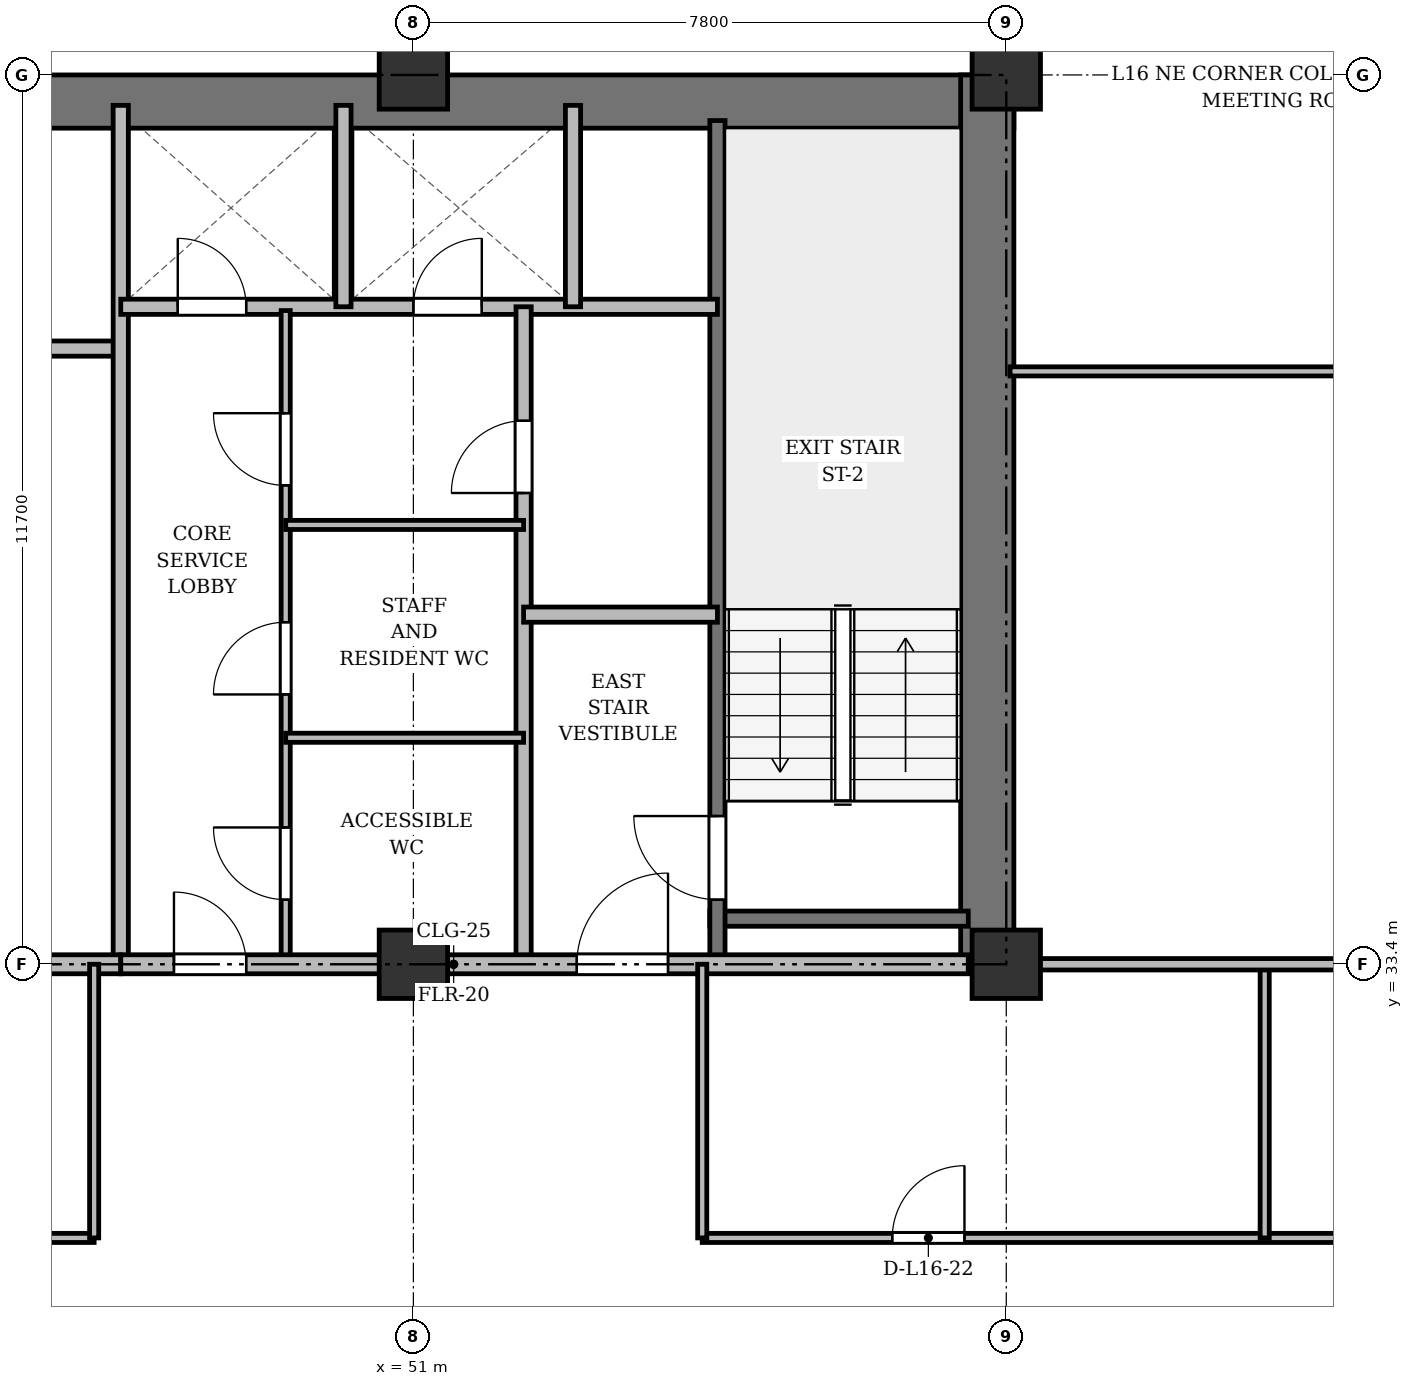
"""IFC4 building model, lengths in metres.
Left out: names, types, materials, properties, quantities, classifications, styles, units other than length and angle.
Written with IfcOpenShell. Run it as: python <this file> out.ifc"""

import sys

from ifc_helpers import new_model, si_unit, direction, frame, frame_2d, origin, origin_2d, place, context, subcontext, project, spatial, rectangle, extrude, source, transform, mapped, element, fill, save


model = new_model("IFC4")
c1 = context("Model", 3, precision=1e-05, world=origin(), true_north=direction((0.0, 1.0)))
c2 = subcontext(c1, "Body", "Model", "MODEL_VIEW")
j1 = project(units=[si_unit("LENGTHUNIT", "METRE"), si_unit("PLANEANGLEUNIT", "RADIAN")], contexts=[c1])
p1 = place(None, origin())
s1 = spatial("IfcSite", under=j1, at=p1, CompositionType="ELEMENT")
p2 = place(p1, origin())
s2 = spatial("IfcBuilding", under=s1, at=p2, CompositionType="ELEMENT")
p3 = place(p2, frame((0.0, 0.0, 63.1)))
s3 = spatial("IfcBuildingStorey", under=s2, at=p3, CompositionType="ELEMENT", Elevation=63.1)
m1 = source(origin(), c2, "Body", "SweptSolid", [
    extrude(rectangle(XDim=0.9, YDim=0.9, at=origin_2d()), origin(), (0.0, 0.0, 1.0), 3.6),
])
for number, where, z_axis, x_axis in (
    (1, (51.0, 33.4, 0.0), (0.0, 0.0, 1.0), (1.0, 0.0, 0.0)),
    (2, (51.0, 45.1, 0.0), (0.0, 0.0, 1.0), (1.0, 0.0, 0.0)),
    (3, (58.8, 33.4, 0.0), (0.0, 0.0, 1.0), (1.0, 0.0, 0.0)),
    (4, (58.8, 45.1, 0.0), (0.0, 0.0, 1.0), (1.0, 0.0, 0.0)),
):
    element("IfcColumn", number, at=place(p3, frame(where, z_axis=z_axis, x_axis=x_axis)), inside=s3, PredefinedType="COLUMN", context=c2, shape_type="MappedRepresentation", body=[
        mapped(m1, transform((0.0, 0.0, 0.0), x_axis=(1.0, 0.0, 0.0), y_axis=(0.0, 1.0, 0.0), z_axis=(0.0, 0.0, 1.0), scale=1.0)),
    ])
p4 = place(p3, frame((15.5, 44.75, 0.0), z_axis=(0.0, 0.0, 1.0), x_axis=(1.0, 0.0, 0.0)))
e5 = element("IfcWall", 5, at=p4, inside=s3, PredefinedType="SHEAR", context=c2, shape_type="SweptSolid", body=[
    extrude(rectangle(XDim=43.4, YDim=0.7, at=frame_2d((21.7, 0.0))), origin(), (0.0, 0.0, 1.0), 3.34),
])
p5 = place(p3, frame((58.55, 33.4, 0.0), z_axis=(0.0, 0.0, 1.0), x_axis=(0.0, 1.0, 0.0)))
e6 = element("IfcWall", 6, at=p5, inside=s3, PredefinedType="SHEAR", context=c2, shape_type="SweptSolid", body=[
    extrude(rectangle(XDim=11.7, YDim=0.7, at=frame_2d((5.85, 0.0))), origin(), (0.0, 0.0, 1.0), 3.34),
])
p6 = place(p3, frame((54.9, 34.0, 0.0), z_axis=(0.0, 0.0, 1.0), x_axis=(1.0, 0.0, 0.0)))
e7 = element("IfcWall", 7, at=p6, inside=s3, PredefinedType="SHEAR", context=c2, shape_type="SweptSolid", body=[
    extrude(rectangle(XDim=3.4, YDim=0.2, at=frame_2d((1.7, 0.0))), origin(), (0.0, 0.0, 1.0), 3.34),
])
p7 = place(p3, frame((55.0, 33.4, 0.0), z_axis=(0.0, 0.0, 1.0), x_axis=(0.0, 1.0, 0.0)))
e8 = element("IfcWall", 8, at=p7, inside=s3, PredefinedType="SHEAR", context=c2, shape_type="SweptSolid", body=[
    extrude(rectangle(XDim=11.1, YDim=0.2, at=frame_2d((5.55, 0.0))), origin(), (0.0, 0.0, 1.0), 3.34),
])
p8 = place(p7, frame((0.85, 0.0, 0.0)))
e9 = element("IfcOpeningElement", 9, at=p8, cuts=e8, PredefinedType="OPENING", context=c2, shape_type="SweptSolid", body=[
    extrude(rectangle(XDim=1.1, YDim=2.15, at=frame_2d((0.55, 1.075))), frame((0.0, 0.11, 0.0), z_axis=(0.0, -1.0, 0.0), x_axis=(1.0, 0.0, 0.0)), (0.0, 0.0, 1.0), 0.22),
])
p9 = place(p3, frame((40.25, 41.5, 0.0), z_axis=(0.0, 0.0, 1.0), x_axis=(1.0, 0.0, 0.0)))
e10 = element("IfcWall", 10, at=p9, inside=s3, PredefinedType="SOLIDWALL", context=c2, shape_type="SweptSolid", body=[
    extrude(rectangle(XDim=6.9, YDim=0.2, at=frame_2d((3.45, 0.0))), origin(), (0.0, 0.0, 1.0), 2.752),
])
p10 = place(p3, frame((47.15, 33.4, 0.0), z_axis=(0.0, 0.0, 1.0), x_axis=(0.0, 1.0, 0.0)))
e11 = element("IfcWall", 11, at=p10, inside=s3, PredefinedType="SOLIDWALL", context=c2, shape_type="SweptSolid", body=[
    extrude(rectangle(XDim=11.3, YDim=0.2, at=frame_2d((5.65, 0.0))), origin(), (0.0, 0.0, 1.0), 2.69),
])
p11 = place(p3, frame((26.3, 33.4, 0.0), z_axis=(0.0, 0.0, 1.0), x_axis=(1.0, 0.0, 0.0)))
e12 = element("IfcWall", 12, at=p11, inside=s3, PredefinedType="PARTITIONING", context=c2, shape_type="SweptSolid", body=[
    extrude(rectangle(XDim=20.85, YDim=0.25, at=frame_2d((10.425, 0.0))), origin(), (0.0, 0.0, 1.0), 2.69),
])
p12 = place(p11, frame((9.2, 0.0, 0.0)))
e13 = element("IfcOpeningElement", 13, at=p12, cuts=e12, PredefinedType="OPENING", context=c2, shape_type="SweptSolid", body=[
    extrude(rectangle(XDim=1.6, YDim=2.2, at=frame_2d((0.8, 1.1))), frame((0.0, 0.135, 0.0), z_axis=(0.0, -1.0, 0.0), x_axis=(1.0, 0.0, 0.0)), (0.0, 0.0, 1.0), 0.27),
])
p13 = place(p3, frame((47.15, 42.05, 0.0), z_axis=(0.0, 0.0, 1.0), x_axis=(1.0, 0.0, 0.0)))
e14 = element("IfcWall", 14, at=p13, inside=s3, PredefinedType="SOLIDWALL", context=c2, shape_type="SweptSolid", body=[
    extrude(rectangle(XDim=7.85, YDim=0.2, at=frame_2d((3.925, 0.0))), origin(), (0.0, 0.0, 1.0), 2.752),
])
p14 = place(p13, frame((0.75, 0.0, 0.0)))
e15 = element("IfcOpeningElement", 15, at=p14, cuts=e14, PredefinedType="OPENING", context=c2, shape_type="SweptSolid", body=[
    extrude(rectangle(XDim=0.9, YDim=2.1, at=frame_2d((0.45, 1.05))), frame((0.0, 0.11, 0.0), z_axis=(0.0, -1.0, 0.0), x_axis=(1.0, 0.0, 0.0)), (0.0, 0.0, 1.0), 0.22),
])
p15 = place(p13, frame((3.85, 0.0, 0.0)))
e16 = element("IfcOpeningElement", 16, at=p15, cuts=e14, PredefinedType="OPENING", context=c2, shape_type="SweptSolid", body=[
    extrude(rectangle(XDim=0.9, YDim=2.1, at=frame_2d((0.45, 1.05))), frame((0.0, 0.11, 0.0), z_axis=(0.0, -1.0, 0.0), x_axis=(1.0, 0.0, 0.0)), (0.0, 0.0, 1.0), 0.22),
])
for number, where, z_axis, x_axis in (
    (17, (50.08, 42.05, 0.0), (0.0, 0.0, 1.0), (0.0, 1.0, 0.0)),
    (18, (53.1, 42.05, 0.0), (0.0, 0.0, 1.0), (0.0, 1.0, 0.0)),
):
    element("IfcWall", number, at=place(p3, frame(where, z_axis=z_axis, x_axis=x_axis)), inside=s3, PredefinedType="SOLIDWALL", context=c2, shape_type="SweptSolid", body=[
        extrude(rectangle(XDim=2.65, YDim=0.2, at=frame_2d((1.325, 0.0))), origin(), (0.0, 0.0, 1.0), 3.34),
    ])
p16 = place(p3, frame((52.45, 33.4, 0.0), z_axis=(0.0, 0.0, 1.0), x_axis=(0.0, 1.0, 0.0)))
e19 = element("IfcWall", 19, at=p16, inside=s3, PredefinedType="PARTITIONING", context=c2, shape_type="SweptSolid", body=[
    extrude(rectangle(XDim=8.65, YDim=0.2, at=frame_2d((4.325, 0.0))), origin(), (0.0, 0.0, 1.0), 2.69),
])
p17 = place(p16, frame((6.2, 0.0, 0.0)))
e20 = element("IfcOpeningElement", 20, at=p17, cuts=e19, PredefinedType="OPENING", context=c2, shape_type="SweptSolid", body=[
    extrude(rectangle(XDim=0.95, YDim=2.15, at=frame_2d((0.475, 1.075))), frame((0.0, 0.11, 0.0), z_axis=(0.0, -1.0, 0.0), x_axis=(1.0, 0.0, 0.0)), (0.0, 0.0, 1.0), 0.22),
])
p18 = place(p3, frame((52.45, 38.0, 0.0), z_axis=(0.0, 0.0, 1.0), x_axis=(1.0, 0.0, 0.0)))
e21 = element("IfcWall", 21, at=p18, inside=s3, PredefinedType="PARTITIONING", context=c2, shape_type="SweptSolid", body=[
    extrude(rectangle(XDim=2.55, YDim=0.2, at=frame_2d((1.275, 0.0))), origin(), (0.0, 0.0, 1.0), 3.34),
])
p19 = place(p3, frame((49.32, 33.4, 0.0), z_axis=(0.0, 0.0, 1.0), x_axis=(0.0, 1.0, 0.0)))
e22 = element("IfcWall", 22, at=p19, inside=s3, PredefinedType="PARTITIONING", context=c2, shape_type="SweptSolid", body=[
    extrude(rectangle(XDim=8.6, YDim=0.12, at=frame_2d((4.3, 0.0))), origin(), (0.0, 0.0, 1.0), 2.69),
])
p20 = place(p19, frame((0.85, 0.0, 0.0)))
e23 = element("IfcOpeningElement", 23, at=p20, cuts=e22, PredefinedType="OPENING", context=c2, shape_type="SweptSolid", body=[
    extrude(rectangle(XDim=0.95, YDim=2.15, at=frame_2d((0.475, 1.075))), frame((0.0, 0.07, 0.0), z_axis=(0.0, -1.0, 0.0), x_axis=(1.0, 0.0, 0.0)), (0.0, 0.0, 1.0), 0.14),
])
p21 = place(p19, frame((3.55, 0.0, 0.0)))
e24 = element("IfcOpeningElement", 24, at=p21, cuts=e22, PredefinedType="OPENING", context=c2, shape_type="SweptSolid", body=[
    extrude(rectangle(XDim=0.95, YDim=2.15, at=frame_2d((0.475, 1.075))), frame((0.0, 0.07, 0.0), z_axis=(0.0, -1.0, 0.0), x_axis=(1.0, 0.0, 0.0)), (0.0, 0.0, 1.0), 0.14),
])
p22 = place(p19, frame((6.3, 0.0, 0.0)))
e25 = element("IfcOpeningElement", 25, at=p22, cuts=e22, PredefinedType="OPENING", context=c2, shape_type="SweptSolid", body=[
    extrude(rectangle(XDim=0.95, YDim=2.15, at=frame_2d((0.475, 1.075))), frame((0.0, 0.07, 0.0), z_axis=(0.0, -1.0, 0.0), x_axis=(1.0, 0.0, 0.0)), (0.0, 0.0, 1.0), 0.14),
])
for number, where, z_axis, x_axis in (
    (26, (49.32, 36.38, 0.0), (0.0, 0.0, 1.0), (1.0, 0.0, 0.0)),
    (27, (49.32, 39.18, 0.0), (0.0, 0.0, 1.0), (1.0, 0.0, 0.0)),
):
    element("IfcWall", number, at=place(p3, frame(where, z_axis=z_axis, x_axis=x_axis)), inside=s3, PredefinedType="PARTITIONING", context=c2, shape_type="SweptSolid", body=[
        extrude(rectangle(XDim=3.13, YDim=0.12, at=frame_2d((1.565, 0.0))), origin(), (0.0, 0.0, 1.0), 2.752),
    ])
p23 = place(p3, frame((47.15, 33.4, 0.0), z_axis=(0.0, 0.0, 1.0), x_axis=(1.0, 0.0, 0.0)))
e28 = element("IfcWall", 28, at=p23, inside=s3, PredefinedType="PARTITIONING", context=c2, shape_type="SweptSolid", body=[
    extrude(rectangle(XDim=11.15, YDim=0.25, at=frame_2d((5.575, 0.0))), origin(), (0.0, 0.0, 1.0), 2.69),
])
p24 = place(p23, frame((0.7, 0.0, 0.0)))
e29 = element("IfcOpeningElement", 29, at=p24, cuts=e28, PredefinedType="OPENING", context=c2, shape_type="SweptSolid", body=[
    extrude(rectangle(XDim=0.95, YDim=2.15, at=frame_2d((0.475, 1.075))), frame((0.0, 0.135, 0.0), z_axis=(0.0, -1.0, 0.0), x_axis=(1.0, 0.0, 0.0)), (0.0, 0.0, 1.0), 0.27),
])
p25 = place(p23, frame((6.0, 0.0, 0.0)))
e30 = element("IfcOpeningElement", 30, at=p25, cuts=e28, PredefinedType="OPENING", context=c2, shape_type="SweptSolid", body=[
    extrude(rectangle(XDim=1.2, YDim=2.15, at=frame_2d((0.6, 1.075))), frame((0.0, 0.135, 0.0), z_axis=(0.0, -1.0, 0.0), x_axis=(1.0, 0.0, 0.0)), (0.0, 0.0, 1.0), 0.27),
])
p26 = place(p3, frame((38.2, 29.8, 0.0), z_axis=(0.0, 0.0, 1.0), x_axis=(1.0, 0.0, 0.0)))
e31 = element("IfcWall", 31, at=p26, inside=s3, PredefinedType="PARTITIONING", context=c2, shape_type="SweptSolid", body=[
    extrude(rectangle(XDim=8.6, YDim=0.12, at=frame_2d((4.3, 0.0))), origin(), (0.0, 0.0, 1.0), 2.752),
])
p27 = place(p26, frame((3.462, 0.0, 0.0)))
e32 = element("IfcOpeningElement", 32, at=p27, cuts=e31, PredefinedType="OPENING", context=c2, shape_type="SweptSolid", body=[
    extrude(rectangle(XDim=0.95, YDim=2.15, at=frame_2d((0.475, 1.075))), frame((0.0, 0.07, 0.0), z_axis=(0.0, -1.0, 0.0), x_axis=(1.0, 0.0, 0.0)), (0.0, 0.0, 1.0), 0.14),
])
p28 = place(p3, frame((54.8, 29.8, 0.0), z_axis=(0.0, 0.0, 1.0), x_axis=(1.0, 0.0, 0.0)))
e33 = element("IfcWall", 33, at=p28, inside=s3, PredefinedType="PARTITIONING", context=c2, shape_type="SweptSolid", body=[
    extrude(rectangle(XDim=14.85, YDim=0.12, at=frame_2d((7.425, 0.0))), origin(), (0.0, 0.0, 1.0), 2.752),
])
p29 = place(p28, frame((2.5, 0.0, 0.0)))
e34 = element("IfcOpeningElement", 34, at=p29, cuts=e33, PredefinedType="OPENING", context=c2, shape_type="SweptSolid", body=[
    extrude(rectangle(XDim=0.95, YDim=2.15, at=frame_2d((0.475, 1.075))), frame((0.0, 0.07, 0.0), z_axis=(0.0, -1.0, 0.0), x_axis=(1.0, 0.0, 0.0)), (0.0, 0.0, 1.0), 0.14),
])
p30 = place(p28, frame((9.2, 0.0, 0.0)))
e35 = element("IfcOpeningElement", 35, at=p30, cuts=e33, PredefinedType="OPENING", context=c2, shape_type="SweptSolid", body=[
    extrude(rectangle(XDim=0.95, YDim=2.15, at=frame_2d((0.475, 1.075))), frame((0.0, 0.07, 0.0), z_axis=(0.0, -1.0, 0.0), x_axis=(1.0, 0.0, 0.0)), (0.0, 0.0, 1.0), 0.14),
])
for number, where, z_axis, x_axis in (
    (36, (62.2, 29.8, 0.0), (0.0, 0.0, 1.0), (0.0, 1.0, 0.0)),
    (37, (46.8, 29.8, 0.0), (0.0, 0.0, 1.0), (0.0, 1.0, 0.0)),
    (38, (54.8, 29.8, 0.0), (0.0, 0.0, 1.0), (0.0, 1.0, 0.0)),
):
    element("IfcWall", number, at=place(p3, frame(where, z_axis=z_axis, x_axis=x_axis)), inside=s3, PredefinedType="PARTITIONING", context=c2, shape_type="SweptSolid", body=[
        extrude(rectangle(XDim=3.6, YDim=0.12, at=frame_2d((1.8, 0.0))), origin(), (0.0, 0.0, 1.0), 2.69),
    ])
p31 = place(p3, frame((58.85, 41.2, 0.0), z_axis=(0.0, 0.0, 1.0), x_axis=(1.0, 0.0, 0.0)))
e39 = element("IfcWall", 39, at=p31, inside=s3, PredefinedType="PARTITIONING", context=c2, shape_type="SweptSolid", body=[
    extrude(rectangle(XDim=10.75, YDim=0.12, at=frame_2d((5.375, 0.0))), origin(), (0.0, 0.0, 1.0), 2.752),
])
p32 = place(p31, frame((4.9, 0.0, 0.0)))
e40 = element("IfcOpeningElement", 40, at=p32, cuts=e39, PredefinedType="OPENING", context=c2, shape_type="SweptSolid", body=[
    extrude(rectangle(XDim=0.95, YDim=2.15, at=frame_2d((0.475, 1.075))), frame((0.0, 0.07, 0.0), z_axis=(0.0, -1.0, 0.0), x_axis=(1.0, 0.0, 0.0)), (0.0, 0.0, 1.0), 0.14),
])
p33 = place(p3, frame((58.8, 33.4, 0.0), z_axis=(0.0, 0.0, 1.0), x_axis=(1.0, 0.0, 0.0)))
e41 = element("IfcWall", 41, at=p33, inside=s3, PredefinedType="PARTITIONING", context=c2, shape_type="SweptSolid", body=[
    extrude(rectangle(XDim=10.85, YDim=0.15, at=frame_2d((5.425, 0.0))), origin(), (0.0, 0.0, 1.0), 2.69),
])
p34 = place(p33, frame((4.76, 0.0, 0.0)))
e42 = element("IfcOpeningElement", 42, at=p34, cuts=e41, PredefinedType="OPENING", context=c2, shape_type="SweptSolid", body=[
    extrude(rectangle(XDim=0.95, YDim=2.15, at=frame_2d((0.475, 1.075))), frame((0.0, 0.085, 0.0), z_axis=(0.0, -1.0, 0.0), x_axis=(1.0, 0.0, 0.0)), (0.0, 0.0, 1.0), 0.17),
])
p35 = place(p3, frame((58.8, 44.75, 0.0), z_axis=(0.0, 0.0, 1.0), x_axis=(0.0, 1.0, 0.0)))
e43 = element("IfcWall", 43, at=p35, inside=s3, PredefinedType="PARTITIONING", context=c2, shape_type="SweptSolid", body=[
    extrude(rectangle(XDim=3.61, YDim=0.15, at=frame_2d((1.805, 0.0))), origin(), (0.0, 0.0, 1.0), 2.752),
])
p36 = place(p35, frame((1.1, 0.0, 0.0)))
e44 = element("IfcOpeningElement", 44, at=p36, cuts=e43, PredefinedType="OPENING", context=c2, shape_type="SweptSolid", body=[
    extrude(rectangle(XDim=0.95, YDim=2.15, at=frame_2d((0.475, 1.075))), frame((0.0, 0.085, 0.0), z_axis=(0.0, -1.0, 0.0), x_axis=(1.0, 0.0, 0.0)), (0.0, 0.0, 1.0), 0.17),
])
m2 = source(origin(), c2, "Body", "SweptSolid", [
    extrude(rectangle(XDim=1.1, YDim=2.15, at=frame_2d((0.55, 1.075))), frame((0.0, 0.025, 0.0), z_axis=(0.0, -1.0, 0.0), x_axis=(1.0, 0.0, 0.0)), (0.0, 0.0, 1.0), 0.05),
])
p37 = place(p8, origin())
e45 = element("IfcDoor", 45, at=p37, inside=s3, OperationType="SINGLE_SWING_RIGHT", PredefinedType="DOOR", context=c2, shape_type="MappedRepresentation", body=[
    mapped(m2, transform((0.0, 0.0, 0.0), x_axis=(1.0, 0.0, 0.0), y_axis=(0.0, 1.0, 0.0), z_axis=(0.0, 0.0, 1.0), scale=1.0)),
])
fill(e9, e45)
m3 = source(origin(), c2, "Body", "SweptSolid", [
    extrude(rectangle(XDim=0.9, YDim=2.1, at=frame_2d((0.45, 1.05))), frame((0.0, 0.025, 0.0), z_axis=(0.0, -1.0, 0.0), x_axis=(1.0, 0.0, 0.0)), (0.0, 0.0, 1.0), 0.05),
])
p38 = place(p14, origin())
e46 = element("IfcDoor", 46, at=p38, inside=s3, OperationType="SINGLE_SWING_LEFT", PredefinedType="DOOR", context=c2, shape_type="MappedRepresentation", body=[
    mapped(m3, transform((0.0, 0.0, 0.0), x_axis=(1.0, 0.0, 0.0), y_axis=(0.0, 1.0, 0.0), z_axis=(0.0, 0.0, 1.0), scale=1.0)),
])
fill(e15, e46)
p39 = place(p15, origin())
e47 = element("IfcDoor", 47, at=p39, inside=s3, OperationType="SINGLE_SWING_RIGHT", PredefinedType="DOOR", context=c2, shape_type="MappedRepresentation", body=[
    mapped(m3, transform((0.0, 0.0, 0.0), x_axis=(1.0, 0.0, 0.0), y_axis=(0.0, 1.0, 0.0), z_axis=(0.0, 0.0, 1.0), scale=1.0)),
])
fill(e16, e47)
m4 = source(origin(), c2, "Body", "SweptSolid", [
    extrude(rectangle(XDim=0.95, YDim=2.15, at=frame_2d((0.475, 1.075))), frame((0.0, 0.025, 0.0), z_axis=(0.0, -1.0, 0.0), x_axis=(1.0, 0.0, 0.0)), (0.0, 0.0, 1.0), 0.05),
])
p40 = place(p17, origin())
e48 = element("IfcDoor", 48, at=p40, inside=s3, OperationType="SINGLE_SWING_LEFT", PredefinedType="DOOR", context=c2, shape_type="MappedRepresentation", body=[
    mapped(m4, transform((0.0, 0.0, 0.0), x_axis=(1.0, 0.0, 0.0), y_axis=(0.0, 1.0, 0.0), z_axis=(0.0, 0.0, 1.0), scale=1.0)),
])
fill(e20, e48)
p41 = place(p20, origin())
e49 = element("IfcDoor", 49, at=p41, inside=s3, OperationType="SINGLE_SWING_RIGHT", PredefinedType="DOOR", context=c2, shape_type="MappedRepresentation", body=[
    mapped(m4, transform((0.0, 0.0, 0.0), x_axis=(1.0, 0.0, 0.0), y_axis=(0.0, 1.0, 0.0), z_axis=(0.0, 0.0, 1.0), scale=1.0)),
])
fill(e23, e49)
p42 = place(p21, origin())
e50 = element("IfcDoor", 50, at=p42, inside=s3, OperationType="SINGLE_SWING_LEFT", PredefinedType="DOOR", context=c2, shape_type="MappedRepresentation", body=[
    mapped(m4, transform((0.0, 0.0, 0.0), x_axis=(1.0, 0.0, 0.0), y_axis=(0.0, 1.0, 0.0), z_axis=(0.0, 0.0, 1.0), scale=1.0)),
])
fill(e24, e50)
p43 = place(p22, origin())
e51 = element("IfcDoor", 51, at=p43, inside=s3, OperationType="SINGLE_SWING_RIGHT", PredefinedType="DOOR", context=c2, shape_type="MappedRepresentation", body=[
    mapped(m4, transform((0.0, 0.0, 0.0), x_axis=(1.0, 0.0, 0.0), y_axis=(0.0, 1.0, 0.0), z_axis=(0.0, 0.0, 1.0), scale=1.0)),
])
fill(e25, e51)
p44 = place(p24, origin())
e52 = element("IfcDoor", 52, at=p44, inside=s3, OperationType="SINGLE_SWING_LEFT", PredefinedType="DOOR", context=c2, shape_type="MappedRepresentation", body=[
    mapped(m4, transform((0.0, 0.0, 0.0), x_axis=(1.0, 0.0, 0.0), y_axis=(0.0, 1.0, 0.0), z_axis=(0.0, 0.0, 1.0), scale=1.0)),
])
fill(e29, e52)
m5 = source(origin(), c2, "Body", "SweptSolid", [
    extrude(rectangle(XDim=1.2, YDim=2.15, at=frame_2d((0.6, 1.075))), frame((0.0, 0.025, 0.0), z_axis=(0.0, -1.0, 0.0), x_axis=(1.0, 0.0, 0.0)), (0.0, 0.0, 1.0), 0.05),
])
p45 = place(p25, origin())
e53 = element("IfcDoor", 53, at=p45, inside=s3, OperationType="SINGLE_SWING_RIGHT", PredefinedType="DOOR", context=c2, shape_type="MappedRepresentation", body=[
    mapped(m5, transform((0.0, 0.0, 0.0), x_axis=(1.0, 0.0, 0.0), y_axis=(0.0, 1.0, 0.0), z_axis=(0.0, 0.0, 1.0), scale=1.0)),
])
fill(e30, e53)
p46 = place(p29, origin())
e54 = element("IfcDoor", 54, at=p46, inside=s3, OperationType="SINGLE_SWING_RIGHT", PredefinedType="DOOR", context=c2, shape_type="MappedRepresentation", body=[
    mapped(m4, transform((0.0, 0.0, 0.0), x_axis=(1.0, 0.0, 0.0), y_axis=(0.0, 1.0, 0.0), z_axis=(0.0, 0.0, 1.0), scale=1.0)),
])
fill(e34, e54)
save(model, sys.argv[1])
